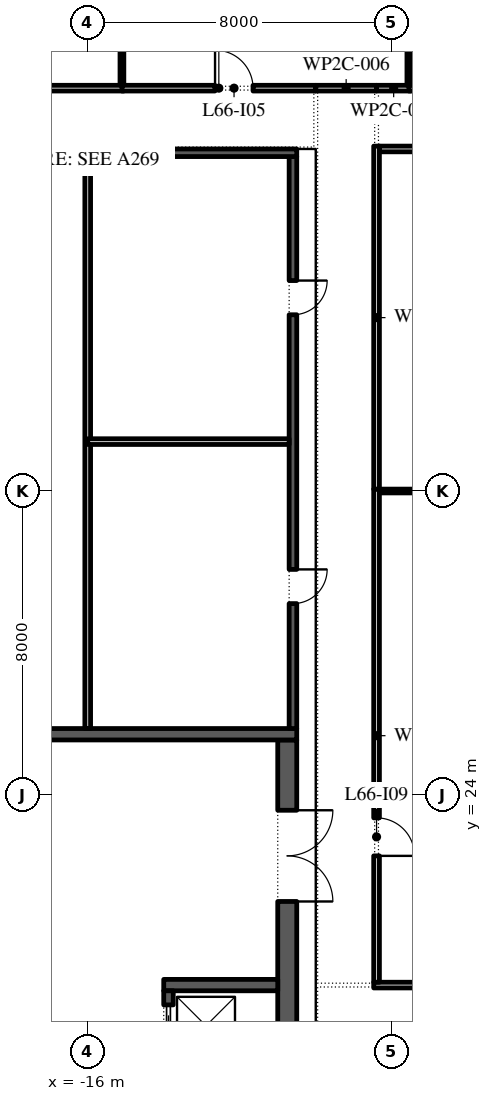
"""IFC4 building model, lengths in metres.
Left out: names, types, materials, properties, quantities, classifications, styles, units other than length and angle.
Written with IfcOpenShell. Run it as: python <this file> out.ifc"""

import sys

from ifc_helpers import new_model, si_unit, direction, frame, frame_2d, origin, place, context, subcontext, project, spatial, rectangle, extrude, element, fill, save


model = new_model("IFC4")
c1 = context("Model", 3, precision=1e-05, world=origin(), true_north=direction((0.0, 1.0)))
c2 = subcontext(c1, "Body", "Model", "MODEL_VIEW")
j1 = project(units=[si_unit("LENGTHUNIT", "METRE"), si_unit("PLANEANGLEUNIT", "RADIAN")], contexts=[c1])
p1 = place(None, origin())
s1 = spatial("IfcSite", under=j1, at=p1, CompositionType="ELEMENT")
p2 = place(p1, origin())
s2 = spatial("IfcBuilding", under=s1, at=p2, CompositionType="ELEMENT")
p3 = place(p2, frame((0.0, 0.0, 303.0)))
s3 = spatial("IfcBuildingStorey", under=s2, at=p3, CompositionType="ELEMENT", Elevation=303.0)
p4 = place(p3, frame((-10.75, -2.45, 0.0), z_axis=(0.0, 0.0, 1.0), x_axis=(0.0, 1.0, 0.0)))
e1 = element("IfcWall", 1, at=p4, inside=s3, PredefinedType="SHEAR", context=c2, shape_type="SweptSolid", body=[
    extrude(rectangle(XDim=27.9, YDim=0.5, at=frame_2d((13.95, 0.0))), origin(), (0.0, 0.0, 1.0), 5.8),
])
p5 = place(p4, frame((23.65, 0.0, 0.0)))
e2 = element("IfcOpeningElement", 2, at=p5, cuts=e1, PredefinedType="OPENING", context=c2, shape_type="SweptSolid", body=[
    extrude(rectangle(XDim=2.4, YDim=2.1, at=frame_2d((1.2, 1.05))), frame((0.0, 0.26, 0.0), z_axis=(0.0, -1.0, 0.0), x_axis=(1.0, 0.0, 0.0)), (0.0, 0.0, 1.0), 0.52),
])
p6 = place(p4, frame((1.087, 0.0, 0.0)))
e3 = element("IfcOpeningElement", 3, at=p6, cuts=e1, PredefinedType="OPENING", context=c2, shape_type="SweptSolid", body=[
    extrude(rectangle(XDim=0.9, YDim=2.1, at=frame_2d((0.45, 1.05))), frame((0.0, 0.26, 0.0), z_axis=(0.0, -1.0, 0.0), x_axis=(1.0, 0.0, 0.0)), (0.0, 0.0, 1.0), 0.52),
])
p7 = place(p4, frame((4.262, 0.0, 0.0)))
e4 = element("IfcOpeningElement", 4, at=p7, cuts=e1, PredefinedType="OPENING", context=c2, shape_type="SweptSolid", body=[
    extrude(rectangle(XDim=1.0, YDim=2.1, at=frame_2d((0.5, 1.05))), frame((0.0, 0.26, 0.0), z_axis=(0.0, -1.0, 0.0), x_axis=(1.0, 0.0, 0.0)), (0.0, 0.0, 1.0), 0.52),
])
p8 = place(p3, frame((-21.5, 25.6, 0.0), z_axis=(0.0, 0.0, 1.0), x_axis=(1.0, 0.0, 0.0)))
e5 = element("IfcWall", 5, at=p8, inside=s3, PredefinedType="SHEAR", context=c2, shape_type="SweptSolid", body=[
    extrude(rectangle(XDim=11.0, YDim=0.3, at=frame_2d((5.5, 0.0))), origin(), (0.0, 0.0, 1.0), 5.8),
])
p9 = place(p3, frame((-14.0, 19.0, 0.0), z_axis=(0.0, 0.0, 1.0), x_axis=(1.0, 0.0, 0.0)))
e6 = element("IfcWall", 6, at=p9, inside=s3, PredefinedType="SHEAR", context=c2, shape_type="SweptSolid", body=[
    extrude(rectangle(XDim=3.0, YDim=0.3, at=frame_2d((1.5, 0.0))), origin(), (0.0, 0.0, 1.0), 5.8),
])
p10 = place(p3, frame((-13.875, -2.45, 0.0), z_axis=(0.0, 0.0, 1.0), x_axis=(0.0, 1.0, 0.0)))
e7 = element("IfcWall", 7, at=p10, inside=s3, PredefinedType="SHEAR", context=c2, shape_type="SweptSolid", body=[
    extrude(rectangle(XDim=21.3, YDim=0.25, at=frame_2d((10.65, 0.0))), origin(), (0.0, 0.0, 1.0), 5.8),
])
p11 = place(p10, frame((11.357, 0.0, 0.0)))
e8 = element("IfcOpeningElement", 8, at=p11, cuts=e7, PredefinedType="OPENING", context=c2, shape_type="SweptSolid", body=[
    extrude(rectangle(XDim=0.9, YDim=2.1, at=frame_2d((0.45, 1.05))), frame((0.0, 0.135, 0.0), z_axis=(0.0, -1.0, 0.0), x_axis=(1.0, 0.0, 0.0)), (0.0, 0.0, 1.0), 0.27),
])
p12 = place(p10, frame((6.971, 0.0, 0.0)))
e9 = element("IfcOpeningElement", 9, at=p12, cuts=e7, PredefinedType="OPENING", context=c2, shape_type="SweptSolid", body=[
    extrude(rectangle(XDim=1.1, YDim=2.1, at=frame_2d((0.55, 1.05))), frame((0.0, 0.135, 0.0), z_axis=(0.0, -1.0, 0.0), x_axis=(1.0, 0.0, 0.0)), (0.0, 0.0, 1.0), 0.27),
])
p13 = place(p10, frame((15.543, 0.0, 0.0)))
e10 = element("IfcOpeningElement", 10, at=p13, cuts=e7, PredefinedType="OPENING", context=c2, shape_type="SweptSolid", body=[
    extrude(rectangle(XDim=1.1, YDim=2.1, at=frame_2d((0.55, 1.05))), frame((0.0, 0.135, 0.0), z_axis=(0.0, -1.0, 0.0), x_axis=(1.0, 0.0, 0.0)), (0.0, 0.0, 1.0), 0.27),
])
p14 = place(p10, frame((17.686, 0.0, 0.0)))
e11 = element("IfcOpeningElement", 11, at=p14, cuts=e7, PredefinedType="OPENING", context=c2, shape_type="SweptSolid", body=[
    extrude(rectangle(XDim=1.1, YDim=2.1, at=frame_2d((0.55, 1.05))), frame((0.0, 0.135, 0.0), z_axis=(0.0, -1.0, 0.0), x_axis=(1.0, 0.0, 0.0)), (0.0, 0.0, 1.0), 0.27),
])
p15 = place(p10, frame((19.829, 0.0, 0.0)))
e12 = element("IfcOpeningElement", 12, at=p15, cuts=e7, PredefinedType="OPENING", context=c2, shape_type="SweptSolid", body=[
    extrude(rectangle(XDim=1.1, YDim=2.1, at=frame_2d((0.55, 1.05))), frame((0.0, 0.135, 0.0), z_axis=(0.0, -1.0, 0.0), x_axis=(1.0, 0.0, 0.0)), (0.0, 0.0, 1.0), 0.27),
])
p16 = place(p3, frame((-10.6, 25.75, 0.0), z_axis=(0.0, 0.0, 1.0), x_axis=(0.0, 1.0, 0.0)))
e13 = element("IfcWall", 13, at=p16, inside=s3, PredefinedType="SHEAR", context=c2, shape_type="SweptSolid", body=[
    extrude(rectangle(XDim=15.05, YDim=0.2, at=frame_2d((7.525, 0.0))), origin(), (0.0, 0.0, 1.0), 5.8),
])
p17 = place(p16, frame((3.288, 0.0, 0.0)))
e14 = element("IfcOpeningElement", 14, at=p17, cuts=e13, PredefinedType="OPENING", context=c2, shape_type="SweptSolid", body=[
    extrude(rectangle(XDim=0.9, YDim=2.1, at=frame_2d((0.45, 1.05))), frame((0.0, 0.11, 0.0), z_axis=(0.0, -1.0, 0.0), x_axis=(1.0, 0.0, 0.0)), (0.0, 0.0, 1.0), 0.22),
])
p18 = place(p16, frame((10.887, 0.0, 0.0)))
e15 = element("IfcOpeningElement", 15, at=p18, cuts=e13, PredefinedType="OPENING", context=c2, shape_type="SweptSolid", body=[
    extrude(rectangle(XDim=0.9, YDim=2.1, at=frame_2d((0.45, 1.05))), frame((0.0, 0.11, 0.0), z_axis=(0.0, -1.0, 0.0), x_axis=(1.0, 0.0, 0.0)), (0.0, 0.0, 1.0), 0.22),
])
p19 = place(p3, frame((-21.5, 40.9, 0.0), z_axis=(0.0, 0.0, 1.0), x_axis=(1.0, 0.0, 0.0)))
e16 = element("IfcWall", 16, at=p19, inside=s3, PredefinedType="SHEAR", context=c2, shape_type="SweptSolid", body=[
    extrude(rectangle(XDim=11.0, YDim=0.2, at=frame_2d((5.5, 0.0))), origin(), (0.0, 0.0, 1.0), 5.8),
])
p20 = place(p3, frame((-16.0, 25.75, 0.0), z_axis=(0.0, 0.0, 1.0), x_axis=(0.0, 1.0, 0.0)))
e17 = element("IfcWall", 17, at=p20, inside=s3, PredefinedType="PARTITIONING", context=c2, shape_type="SweptSolid", body=[
    extrude(rectangle(XDim=15.05, YDim=0.15, at=frame_2d((7.525, 0.0))), origin(), (0.0, 0.0, 1.0), 5.8),
])
p21 = place(p3, frame((-16.0, 33.3, 0.0), z_axis=(0.0, 0.0, 1.0), x_axis=(1.0, 0.0, 0.0)))
e18 = element("IfcWall", 18, at=p21, inside=s3, PredefinedType="PARTITIONING", context=c2, shape_type="SweptSolid", body=[
    extrude(rectangle(XDim=5.3, YDim=0.15, at=frame_2d((2.65, 0.0))), origin(), (0.0, 0.0, 1.0), 5.8),
])
p22 = place(p3, frame((-26.05, 42.6, 0.0), z_axis=(0.0, 0.0, 1.0), x_axis=(1.0, 0.0, 0.0)))
e19 = element("IfcWall", 19, at=p22, inside=s3, PredefinedType="PARTITIONING", context=c2, shape_type="SweptSolid", body=[
    extrude(rectangle(XDim=11.0, YDim=0.15, at=frame_2d((5.5, 0.0))), origin(), (0.0, 0.0, 1.0), 5.8),
])
p23 = place(p22, frame((3.8, 0.0, 0.0)))
e20 = element("IfcOpeningElement", 20, at=p23, cuts=e19, PredefinedType="OPENING", context=c2, shape_type="SweptSolid", body=[
    extrude(rectangle(XDim=1.0, YDim=2.1, at=frame_2d((0.5, 1.05))), frame((0.0, 0.085, 0.0), z_axis=(0.0, -1.0, 0.0), x_axis=(1.0, 0.0, 0.0)), (0.0, 0.0, 1.0), 0.17),
])
p24 = place(p3, frame((-15.1, 42.675, 0.0), z_axis=(0.0, 0.0, 1.0), x_axis=(0.0, 1.0, 0.0)))
e21 = element("IfcWall", 21, at=p24, inside=s3, PredefinedType="PARTITIONING", context=c2, shape_type="SweptSolid", body=[
    extrude(rectangle(XDim=10.125, YDim=0.1, at=frame_2d((5.062, 0.0))), origin(), (0.0, 0.0, 1.0), 5.8),
])
p25 = place(p3, frame((-15.1, 42.6, 0.0), z_axis=(0.0, 0.0, 1.0), x_axis=(1.0, 0.0, 0.0)))
e22 = element("IfcWall", 22, at=p25, inside=s3, PredefinedType="PARTITIONING", context=c2, shape_type="SweptSolid", body=[
    extrude(rectangle(XDim=5.1, YDim=0.15, at=frame_2d((2.55, 0.0))), origin(), (0.0, 0.0, 1.0), 5.8),
])
p26 = place(p25, frame((2.45, 0.0, 0.0)))
e23 = element("IfcOpeningElement", 23, at=p26, cuts=e22, PredefinedType="OPENING", context=c2, shape_type="SweptSolid", body=[
    extrude(rectangle(XDim=1.0, YDim=2.1, at=frame_2d((0.5, 1.05))), frame((0.0, 0.085, 0.0), z_axis=(0.0, -1.0, 0.0), x_axis=(1.0, 0.0, 0.0)), (0.0, 0.0, 1.0), 0.17),
])
p27 = place(p3, frame((-10.0, 42.6, 0.0), z_axis=(0.0, 0.0, 1.0), x_axis=(1.0, 0.0, 0.0)))
e24 = element("IfcWall", 24, at=p27, inside=s3, PredefinedType="PARTITIONING", context=c2, shape_type="SweptSolid", body=[
    extrude(rectangle(XDim=1.6, YDim=0.15, at=frame_2d((0.8, 0.0))), origin(), (0.0, 0.0, 1.0), 5.8),
])
p28 = place(p3, frame((-8.475, 19.0, 0.0), z_axis=(0.0, 0.0, 1.0), x_axis=(1.0, 0.0, 0.0)))
e25 = element("IfcWall", 25, at=p28, inside=s3, PredefinedType="PARTITIONING", context=c2, shape_type="SweptSolid", body=[
    extrude(rectangle(XDim=8.525, YDim=0.15, at=frame_2d((4.263, 0.0))), origin(), (0.0, 0.0, 1.0), 5.8),
])
p29 = place(p3, frame((-8.4, 32.05, 0.0), z_axis=(0.0, 0.0, 1.0), x_axis=(0.0, -1.0, 0.0)))
e26 = element("IfcWall", 26, at=p29, inside=s3, PredefinedType="PARTITIONING", context=c2, shape_type="SweptSolid", body=[
    extrude(rectangle(XDim=12.975, YDim=0.15, at=frame_2d((6.488, 0.0))), origin(), (0.0, 0.0, 1.0), 5.8),
])
p30 = place(p29, frame((8.65, 0.0, 0.0)))
e27 = element("IfcOpeningElement", 27, at=p30, cuts=e26, PredefinedType="OPENING", context=c2, shape_type="SweptSolid", body=[
    extrude(rectangle(XDim=1.0, YDim=2.1, at=frame_2d((0.5, 1.05))), frame((0.0, 0.085, 0.0), z_axis=(0.0, -1.0, 0.0), x_axis=(1.0, 0.0, 0.0)), (0.0, 0.0, 1.0), 0.17),
])
p31 = place(p3, frame((-8.4, 41.075, 0.0), z_axis=(0.0, 0.0, 1.0), x_axis=(0.0, -1.0, 0.0)))
e28 = element("IfcWall", 28, at=p31, inside=s3, PredefinedType="PARTITIONING", context=c2, shape_type="SweptSolid", body=[
    extrude(rectangle(XDim=9.025, YDim=0.15, at=frame_2d((4.512, 0.0))), origin(), (0.0, 0.0, 1.0), 5.8),
])
p32 = place(p3, frame((-8.4, 42.6, 0.0), z_axis=(0.0, 0.0, 1.0), x_axis=(1.0, 0.0, 0.0)))
e29 = element("IfcWall", 29, at=p32, inside=s3, PredefinedType="PARTITIONING", context=c2, shape_type="SweptSolid", body=[
    extrude(rectangle(XDim=0.9, YDim=0.15, at=frame_2d((0.45, 0.0))), origin(), (0.0, 0.0, 1.0), 5.8),
])
p33 = place(p3, frame((-7.55, 42.675, 0.0), z_axis=(0.0, 0.0, 1.0), x_axis=(0.0, 1.0, 0.0)))
e30 = element("IfcWall", 30, at=p33, inside=s3, PredefinedType="PARTITIONING", context=c2, shape_type="SweptSolid", body=[
    extrude(rectangle(XDim=10.125, YDim=0.1, at=frame_2d((5.062, 0.0))), origin(), (0.0, 0.0, 1.0), 5.8),
])
p34 = place(p3, frame((-7.55, 42.6, 0.0), z_axis=(0.0, 0.0, 1.0), x_axis=(1.0, 0.0, 0.0)))
e31 = element("IfcWall", 31, at=p34, inside=s3, PredefinedType="PARTITIONING", context=c2, shape_type="SweptSolid", body=[
    extrude(rectangle(XDim=7.6, YDim=0.15, at=frame_2d((3.8, 0.0))), origin(), (0.0, 0.0, 1.0), 5.8),
])
p35 = place(p34, frame((4.9, 0.0, 0.0)))
e32 = element("IfcOpeningElement", 32, at=p35, cuts=e31, PredefinedType="OPENING", context=c2, shape_type="SweptSolid", body=[
    extrude(rectangle(XDim=1.0, YDim=2.1, at=frame_2d((0.5, 1.05))), frame((0.0, 0.085, 0.0), z_axis=(0.0, -1.0, 0.0), x_axis=(1.0, 0.0, 0.0)), (0.0, 0.0, 1.0), 0.17),
])
p36 = place(p3, frame((-0.05, 32.0, 0.0), z_axis=(0.0, 0.0, 1.0), x_axis=(-1.0, 0.0, 0.0)))
e33 = element("IfcWall", 33, at=p36, inside=s3, PredefinedType="PARTITIONING", context=c2, shape_type="SweptSolid", body=[
    extrude(rectangle(XDim=8.275, YDim=0.1, at=frame_2d((4.137, 0.0))), origin(), (0.0, 0.0, 1.0), 5.8),
])
p37 = place(p3, frame((8.325, 41.0, 0.0), z_axis=(0.0, 0.0, 1.0), x_axis=(-1.0, 0.0, 0.0)))
e34 = element("IfcWall", 34, at=p37, inside=s3, PredefinedType="PARTITIONING", context=c2, shape_type="SweptSolid", body=[
    extrude(rectangle(XDim=16.65, YDim=0.15, at=frame_2d((8.325, 0.0))), origin(), (0.0, 0.0, 1.0), 5.8),
])
p38 = place(p37, frame((4.575, 0.0, 0.0)))
e35 = element("IfcOpeningElement", 35, at=p38, cuts=e34, PredefinedType="OPENING", context=c2, shape_type="SweptSolid", body=[
    extrude(rectangle(XDim=1.0, YDim=2.1, at=frame_2d((0.5, 1.05))), frame((0.0, 0.085, 0.0), z_axis=(0.0, -1.0, 0.0), x_axis=(1.0, 0.0, 0.0)), (0.0, 0.0, 1.0), 0.17),
])
p39 = place(p15, origin())
e36 = element("IfcDoor", 36, at=p39, inside=s3, OperationType="SLIDING_TO_LEFT", PredefinedType="DOOR", context=c2, shape_type="SweptSolid", body=[
    extrude(rectangle(XDim=1.1, YDim=2.1, at=frame_2d((0.55, 1.05))), frame((0.0, 0.025, 0.0), z_axis=(0.0, -1.0, 0.0), x_axis=(1.0, 0.0, 0.0)), (0.0, 0.0, 1.0), 0.05),
])
fill(e12, e36)
p40 = place(p5, frame((2.4, 0.0, 0.0), z_axis=(0.0, 0.0, 1.0), x_axis=(-1.0, 0.0, 0.0)))
e37 = element("IfcDoor", 37, at=p40, inside=s3, OperationType="DOUBLE_DOOR_SINGLE_SWING", PredefinedType="DOOR", context=c2, shape_type="SweptSolid", body=[
    extrude(rectangle(XDim=2.4, YDim=2.1, at=frame_2d((1.2, 1.05))), frame((0.0, 0.025, 0.0), z_axis=(0.0, -1.0, 0.0), x_axis=(1.0, 0.0, 0.0)), (0.0, 0.0, 1.0), 0.05),
])
fill(e2, e37)
p41 = place(p17, frame((0.9, 0.15, 0.0), z_axis=(0.0, 0.0, 1.0), x_axis=(-1.0, 0.0, 0.0)))
e38 = element("IfcDoor", 38, at=p41, inside=s3, OperationType="SINGLE_SWING_RIGHT", PredefinedType="DOOR", context=c2, shape_type="SweptSolid", body=[
    extrude(rectangle(XDim=0.9, YDim=2.1, at=frame_2d((0.45, 1.05))), frame((0.0, 0.1, 0.0), z_axis=(0.0, -1.0, 0.0), x_axis=(1.0, 0.0, 0.0)), (0.0, 0.0, 1.0), 0.05),
])
fill(e14, e38)
p42 = place(p18, frame((0.9, 0.15, 0.0), z_axis=(0.0, 0.0, 1.0), x_axis=(-1.0, 0.0, 0.0)))
e39 = element("IfcDoor", 39, at=p42, inside=s3, OperationType="SINGLE_SWING_RIGHT", PredefinedType="DOOR", context=c2, shape_type="SweptSolid", body=[
    extrude(rectangle(XDim=0.9, YDim=2.1, at=frame_2d((0.45, 1.05))), frame((0.0, 0.1, 0.0), z_axis=(0.0, -1.0, 0.0), x_axis=(1.0, 0.0, 0.0)), (0.0, 0.0, 1.0), 0.05),
])
fill(e15, e39)
p43 = place(p26, origin())
e40 = element("IfcDoor", 40, at=p43, inside=s3, OperationType="SINGLE_SWING_RIGHT", PredefinedType="DOOR", context=c2, shape_type="SweptSolid", body=[
    extrude(rectangle(XDim=1.0, YDim=2.1, at=frame_2d((0.5, 1.05))), frame((0.0, 0.025, 0.0), z_axis=(0.0, -1.0, 0.0), x_axis=(1.0, 0.0, 0.0)), (0.0, 0.0, 1.0), 0.05),
])
fill(e23, e40)
p44 = place(p30, origin())
e41 = element("IfcDoor", 41, at=p44, inside=s3, OperationType="SINGLE_SWING_LEFT", PredefinedType="DOOR", context=c2, shape_type="SweptSolid", body=[
    extrude(rectangle(XDim=1.0, YDim=2.1, at=frame_2d((0.5, 1.05))), frame((0.0, 0.025, 0.0), z_axis=(0.0, -1.0, 0.0), x_axis=(1.0, 0.0, 0.0)), (0.0, 0.0, 1.0), 0.05),
])
fill(e27, e41)
save(model, sys.argv[1])
